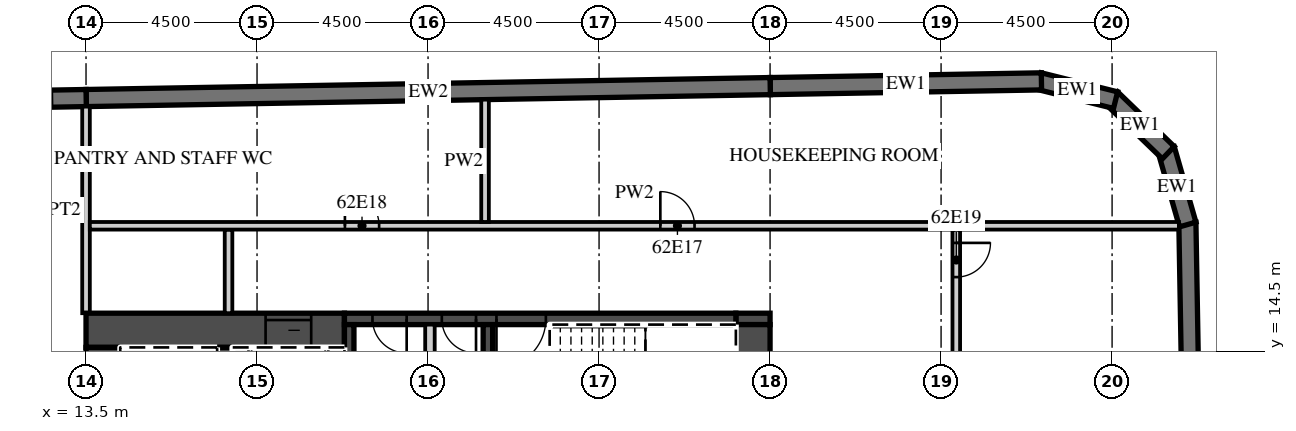
"""IFC4 building model, lengths in metres.
Left out: names, types, materials, properties, quantities, classifications, styles, units other than length and angle.
Written with IfcOpenShell. Run it as: python <this file> out.ifc"""

import sys

from ifc_helpers import new_model, si_unit, direction, frame, frame_2d, origin, place, context, subcontext, project, spatial, polyline, rectangle, outline, extrude, element, fill, save


model = new_model("IFC4")
c1 = context("Model", 3, precision=1e-05, world=origin(), true_north=direction((0.0, 1.0)))
c2 = subcontext(c1, "Body", "Model", "MODEL_VIEW")
j1 = project(units=[si_unit("LENGTHUNIT", "METRE"), si_unit("PLANEANGLEUNIT", "RADIAN")], contexts=[c1])
p1 = place(None, origin())
s1 = spatial("IfcSite", under=j1, at=p1, CompositionType="ELEMENT")
p2 = place(p1, origin())
s2 = spatial("IfcBuilding", under=s1, at=p2, CompositionType="ELEMENT")
p3 = place(p2, frame((0.0, 0.0, 250.7)))
s3 = spatial("IfcBuildingStorey", under=s2, at=p3, CompositionType="ELEMENT", Elevation=250.7)
p4 = place(p3, frame((43.057, -15.103, 0.0), z_axis=(0.0, 0.0, 1.0), x_axis=(-0.017452408953, 0.999847695112, 0.0)))
e1 = element("IfcWall", 1, at=p4, inside=s3, PredefinedType="SOLIDWALL", context=c2, shape_type="SweptSolid", body=[
    extrude(rectangle(XDim=33.0, YDim=0.45, at=frame_2d((16.5, 0.0))), origin(), (0.0, 0.0, 1.0), 3.02),
])
p5 = place(p3, frame((42.49, 17.833, 0.0), z_axis=(0.0, 0.0, 1.0), x_axis=(-0.275546368831, 0.961287781377, 0.0)))
e2 = element("IfcWall", 2, at=p5, inside=s3, PredefinedType="SOLIDWALL", context=c2, shape_type="SweptSolid", body=[
    extrude(outline(polyline([(0.0, -0.225), (2.071, -0.225), (1.95, 0.225), (0.121, 0.225), (0.0, -0.225)])), origin(), (0.0, 0.0, 1.0), 3.02),
])
p6 = place(p3, frame((41.979, 19.724, 0.0), z_axis=(0.0, 0.0, 1.0), x_axis=(-0.719379111448, 0.694617660308, 0.0)))
e3 = element("IfcWall", 3, at=p6, inside=s3, PredefinedType="SOLIDWALL", context=c2, shape_type="SweptSolid", body=[
    extrude(outline(polyline([(0.0, -0.225), (2.071, -0.225), (1.95, 0.225), (0.121, 0.225), (0.0, -0.225)])), origin(), (0.0, 0.0, 1.0), 3.02),
])
p7 = place(p3, frame((40.591, 21.106, 0.0), z_axis=(0.0, 0.0, 1.0), x_axis=(-0.970287979719, 0.241952963225, 0.0)))
e4 = element("IfcWall", 4, at=p7, inside=s3, PredefinedType="SOLIDWALL", context=c2, shape_type="SweptSolid", body=[
    extrude(outline(polyline([(0.0, -0.225), (2.071, -0.225), (1.95, 0.225), (0.121, 0.225), (0.0, -0.225)])), origin(), (0.0, 0.0, 1.0), 3.02),
])
p8 = place(p3, frame((38.641, 21.6, 0.0), z_axis=(0.0, 0.0, 1.0), x_axis=(-0.999847245074, -0.017478172627, 0.0)))
e5 = element("IfcWall", 5, at=p8, inside=s3, PredefinedType="SOLIDWALL", context=c2, shape_type="SweptSolid", body=[
    extrude(rectangle(XDim=7.138, YDim=0.45, at=frame_2d((3.569, 0.0))), origin(), (0.0, 0.0, 1.0), 3.02),
])
p9 = place(p3, frame((31.504, 21.476, 0.0), z_axis=(0.0, 0.0, 1.0), x_axis=(-0.999847677887, -0.017453395744, 0.0)))
e6 = element("IfcWall", 6, at=p9, inside=s3, PredefinedType="SOLIDWALL", context=c2, shape_type="SweptSolid", body=[
    extrude(rectangle(XDim=18.003, YDim=0.45, at=frame_2d((9.001, 0.0))), origin(), (0.0, 0.0, 1.0), 3.02),
])
p10 = place(p3, frame((13.504, 21.161, 0.0), z_axis=(0.0, 0.0, 1.0), x_axis=(-0.999847763257, -0.017448504532, 0.0)))
e7 = element("IfcWall", 7, at=p10, inside=s3, PredefinedType="SOLIDWALL", context=c2, shape_type="SweptSolid", body=[
    extrude(rectangle(XDim=46.859, YDim=0.45, at=frame_2d((23.43, 0.0))), origin(), (0.0, 0.0, 1.0), 3.02),
])
p11 = place(p10, frame((0.9, 0.0, 0.45)))
e8 = element("IfcOpeningElement", 8, at=p11, cuts=e7, PredefinedType="OPENING", context=c2, shape_type="SweptSolid", body=[
    extrude(rectangle(XDim=2.7, YDim=2.25, at=frame_2d((1.35, 1.125))), frame((0.0, 0.235, 0.0), z_axis=(0.0, -1.0, 0.0), x_axis=(1.0, 0.0, 0.0)), (0.0, 0.0, 1.0), 0.47),
])
p12 = place(p10, frame((5.401, 0.0, 0.45)))
e9 = element("IfcOpeningElement", 9, at=p12, cuts=e7, PredefinedType="OPENING", context=c2, shape_type="SweptSolid", body=[
    extrude(rectangle(XDim=2.7, YDim=2.25, at=frame_2d((1.35, 1.125))), frame((0.0, 0.235, 0.0), z_axis=(0.0, -1.0, 0.0), x_axis=(1.0, 0.0, 0.0)), (0.0, 0.0, 1.0), 0.47),
])
p13 = place(p10, frame((9.902, 0.0, 0.45)))
e10 = element("IfcOpeningElement", 10, at=p13, cuts=e7, PredefinedType="OPENING", context=c2, shape_type="SweptSolid", body=[
    extrude(rectangle(XDim=2.7, YDim=2.25, at=frame_2d((1.35, 1.125))), frame((0.0, 0.235, 0.0), z_axis=(0.0, -1.0, 0.0), x_axis=(1.0, 0.0, 0.0)), (0.0, 0.0, 1.0), 0.47),
])
p14 = place(p10, frame((14.402, 0.0, 0.45)))
e11 = element("IfcOpeningElement", 11, at=p14, cuts=e7, PredefinedType="OPENING", context=c2, shape_type="SweptSolid", body=[
    extrude(rectangle(XDim=2.7, YDim=2.25, at=frame_2d((1.35, 1.125))), frame((0.0, 0.235, 0.0), z_axis=(0.0, -1.0, 0.0), x_axis=(1.0, 0.0, 0.0)), (0.0, 0.0, 1.0), 0.47),
])
p15 = place(p10, frame((18.903, 0.0, 0.45)))
e12 = element("IfcOpeningElement", 12, at=p15, cuts=e7, PredefinedType="OPENING", context=c2, shape_type="SweptSolid", body=[
    extrude(rectangle(XDim=2.7, YDim=2.25, at=frame_2d((1.35, 1.125))), frame((0.0, 0.235, 0.0), z_axis=(0.0, -1.0, 0.0), x_axis=(1.0, 0.0, 0.0)), (0.0, 0.0, 1.0), 0.47),
])
p16 = place(p10, frame((23.404, 0.0, 0.45)))
e13 = element("IfcOpeningElement", 13, at=p16, cuts=e7, PredefinedType="OPENING", context=c2, shape_type="SweptSolid", body=[
    extrude(rectangle(XDim=2.7, YDim=2.25, at=frame_2d((1.35, 1.125))), frame((0.0, 0.235, 0.0), z_axis=(0.0, -1.0, 0.0), x_axis=(1.0, 0.0, 0.0)), (0.0, 0.0, 1.0), 0.47),
])
p17 = place(p10, frame((27.904, 0.0, 0.45)))
e14 = element("IfcOpeningElement", 14, at=p17, cuts=e7, PredefinedType="OPENING", context=c2, shape_type="SweptSolid", body=[
    extrude(rectangle(XDim=2.7, YDim=2.25, at=frame_2d((1.35, 1.125))), frame((0.0, 0.235, 0.0), z_axis=(0.0, -1.0, 0.0), x_axis=(1.0, 0.0, 0.0)), (0.0, 0.0, 1.0), 0.47),
])
p18 = place(p10, frame((32.405, 0.0, 0.45)))
e15 = element("IfcOpeningElement", 15, at=p18, cuts=e7, PredefinedType="OPENING", context=c2, shape_type="SweptSolid", body=[
    extrude(rectangle(XDim=2.7, YDim=2.25, at=frame_2d((1.35, 1.125))), frame((0.0, 0.235, 0.0), z_axis=(0.0, -1.0, 0.0), x_axis=(1.0, 0.0, 0.0)), (0.0, 0.0, 1.0), 0.47),
])
p19 = place(p10, frame((36.906, 0.0, 0.45)))
e16 = element("IfcOpeningElement", 16, at=p19, cuts=e7, PredefinedType="OPENING", context=c2, shape_type="SweptSolid", body=[
    extrude(rectangle(XDim=2.7, YDim=2.25, at=frame_2d((1.35, 1.125))), frame((0.0, 0.235, 0.0), z_axis=(0.0, -1.0, 0.0), x_axis=(1.0, 0.0, 0.0)), (0.0, 0.0, 1.0), 0.47),
])
p20 = place(p10, frame((41.406, 0.0, 0.45)))
e17 = element("IfcOpeningElement", 17, at=p20, cuts=e7, PredefinedType="OPENING", context=c2, shape_type="SweptSolid", body=[
    extrude(rectangle(XDim=2.7, YDim=2.25, at=frame_2d((1.35, 1.125))), frame((0.0, 0.235, 0.0), z_axis=(0.0, -1.0, 0.0), x_axis=(1.0, 0.0, 0.0)), (0.0, 0.0, 1.0), 0.47),
])
p21 = place(p3, frame((13.5, 15.5, 0.0), z_axis=(0.0, 0.0, 1.0), x_axis=(0.0, 1.0, 0.0)))
e18 = element("IfcWall", 18, at=p21, inside=s3, PredefinedType="PARTITIONING", context=c2, shape_type="SweptSolid", body=[
    extrude(rectangle(XDim=5.436, YDim=0.2, at=frame_2d((2.718, 0.0))), origin(), (0.0, 0.0, 1.0), 3.02),
])
p22 = place(p3, frame((13.5, 15.05, 0.0), z_axis=(0.0, 0.0, 1.0), x_axis=(1.0, 0.0, 0.0)))
e19 = element("IfcWall", 19, at=p22, inside=s3, PredefinedType="SHEAR", context=c2, shape_type="SweptSolid", body=[
    extrude(rectangle(XDim=6.8, YDim=0.9, at=frame_2d((3.4, 0.0))), origin(), (0.0, 0.0, 1.0), 3.02),
])
p23 = place(p22, frame((4.725, 0.0, 0.0)))
e20 = element("IfcOpeningElement", 20, at=p23, cuts=e19, PredefinedType="OPENING", context=c2, shape_type="SweptSolid", body=[
    extrude(rectangle(XDim=1.2, YDim=2.1, at=frame_2d((0.6, 1.05))), frame((0.0, 0.46, 0.0), z_axis=(0.0, -1.0, 0.0), x_axis=(1.0, 0.0, 0.0)), (0.0, 0.0, 1.0), 0.92),
])
p24 = place(p3, frame((30.6, 15.35, 0.0), z_axis=(0.0, 0.0, 1.0), x_axis=(1.0, 0.0, 0.0)))
e21 = element("IfcWall", 21, at=p24, inside=s3, PredefinedType="SHEAR", context=c2, shape_type="SweptSolid", body=[
    extrude(rectangle(XDim=0.9, YDim=0.3, at=frame_2d((0.45, 0.0))), origin(), (0.0, 0.0, 1.0), 3.02),
])
p25 = place(p3, frame((20.3, 15.35, 0.0), z_axis=(0.0, 0.0, 1.0), x_axis=(1.0, 0.0, 0.0)))
e22 = element("IfcWall", 22, at=p25, inside=s3, PredefinedType="SHEAR", context=c2, shape_type="SweptSolid", body=[
    extrude(rectangle(XDim=10.3, YDim=0.3, at=frame_2d((5.15, 0.0))), origin(), (0.0, 0.0, 1.0), 3.02),
])
p26 = place(p25, frame((4.0, 0.0, 0.0)))
e23 = element("IfcOpeningElement", 23, at=p26, cuts=e22, PredefinedType="OPENING", context=c2, shape_type="SweptSolid", body=[
    extrude(rectangle(XDim=1.3, YDim=2.1, at=frame_2d((0.65, 1.05))), frame((0.0, 0.16, 0.0), z_axis=(0.0, -1.0, 0.0), x_axis=(1.0, 0.0, 0.0)), (0.0, 0.0, 1.0), 0.32),
])
p27 = place(p25, frame((2.562, 0.0, 0.0)))
e24 = element("IfcOpeningElement", 24, at=p27, cuts=e22, PredefinedType="OPENING", context=c2, shape_type="SweptSolid", body=[
    extrude(rectangle(XDim=0.9, YDim=2.1, at=frame_2d((0.45, 1.05))), frame((0.0, 0.16, 0.0), z_axis=(0.0, -1.0, 0.0), x_axis=(1.0, 0.0, 0.0)), (0.0, 0.0, 1.0), 0.32),
])
p28 = place(p25, frame((0.738, 0.0, 0.0)))
e25 = element("IfcOpeningElement", 25, at=p28, cuts=e22, PredefinedType="OPENING", context=c2, shape_type="SweptSolid", body=[
    extrude(rectangle(XDim=0.9, YDim=2.1, at=frame_2d((0.45, 1.05))), frame((0.0, 0.16, 0.0), z_axis=(0.0, -1.0, 0.0), x_axis=(1.0, 0.0, 0.0)), (0.0, 0.0, 1.0), 0.32),
])
p29 = place(p3, frame((31.05, 2.4, 0.0), z_axis=(0.0, 0.0, 1.0), x_axis=(0.0, 1.0, 0.0)))
e26 = element("IfcWall", 26, at=p29, inside=s3, PredefinedType="SHEAR", context=c2, shape_type="SweptSolid", body=[
    extrude(rectangle(XDim=12.8, YDim=0.9, at=frame_2d((6.4, 0.0))), origin(), (0.0, 0.0, 1.0), 3.02),
])
p30 = place(p29, frame((0.2, 0.0, 0.0)))
e27 = element("IfcOpeningElement", 27, at=p30, cuts=e26, PredefinedType="OPENING", context=c2, shape_type="SweptSolid", body=[
    extrude(rectangle(XDim=1.1, YDim=2.1, at=frame_2d((0.55, 1.05))), frame((0.0, 0.46, 0.0), z_axis=(0.0, -1.0, 0.0), x_axis=(1.0, 0.0, 0.0)), (0.0, 0.0, 1.0), 0.92),
])
p31 = place(p3, frame((13.95, 2.4, 0.0), z_axis=(0.0, 0.0, 1.0), x_axis=(0.0, 1.0, 0.0)))
e28 = element("IfcWall", 28, at=p31, inside=s3, PredefinedType="SHEAR", context=c2, shape_type="SweptSolid", body=[
    extrude(rectangle(XDim=12.2, YDim=0.9, at=frame_2d((6.1, 0.0))), origin(), (0.0, 0.0, 1.0), 3.02),
])
p32 = place(p3, frame((17.15, 8.8, 0.0), z_axis=(0.0, 0.0, 1.0), x_axis=(0.0, 1.0, 0.0)))
e29 = element("IfcWall", 29, at=p32, inside=s3, PredefinedType="SHEAR", context=c2, shape_type="SweptSolid", body=[
    extrude(rectangle(XDim=5.8, YDim=0.4, at=frame_2d((2.9, 0.0))), origin(), (0.0, 0.0, 1.0), 3.02),
])
for number, where, z_axis, x_axis in (
    (30, (20.425, 11.95, 0.0), (0.0, 0.0, 1.0), (0.0, 1.0, 0.0)),
    (31, (24.075, 11.95, 0.0), (0.0, 0.0, 1.0), (0.0, 1.0, 0.0)),
):
    element("IfcWall", number, at=place(p3, frame(where, z_axis=z_axis, x_axis=x_axis)), inside=s3, PredefinedType="SHEAR", context=c2, shape_type="SweptSolid", body=[
        extrude(rectangle(XDim=3.25, YDim=0.25, at=frame_2d((1.625, 0.0))), origin(), (0.0, 0.0, 1.0), 3.02),
    ])
p33 = place(p3, frame((22.55, 11.95, 0.0), z_axis=(0.0, 0.0, 1.0), x_axis=(0.0, 1.0, 0.0)))
e32 = element("IfcWall", 32, at=p33, inside=s3, PredefinedType="PARTITIONING", context=c2, shape_type="SweptSolid", body=[
    extrude(rectangle(XDim=3.25, YDim=0.25, at=frame_2d((1.625, 0.0))), origin(), (0.0, 0.0, 1.0), 3.02),
])
p34 = place(p3, frame((17.25, 15.5, 0.0), z_axis=(0.0, 0.0, 1.0), x_axis=(0.0, 1.0, 0.0)))
e33 = element("IfcWall", 33, at=p34, inside=s3, PredefinedType="PARTITIONING", context=c2, shape_type="SweptSolid", body=[
    extrude(rectangle(XDim=2.2, YDim=0.2, at=frame_2d((1.1, 0.0))), origin(), (0.0, 0.0, 1.0), 3.02),
])
p35 = place(p3, frame((36.4, 1.75, 0.0), z_axis=(0.0, 0.0, 1.0), x_axis=(0.0, 1.0, 0.0)))
e34 = element("IfcWall", 34, at=p35, inside=s3, PredefinedType="PARTITIONING", context=c2, shape_type="SweptSolid", body=[
    extrude(rectangle(XDim=15.95, YDim=0.2, at=frame_2d((7.975, 0.0))), origin(), (0.0, 0.0, 1.0), 3.02),
])
p36 = place(p35, frame((14.7, 0.0, 0.0)))
e35 = element("IfcOpeningElement", 35, at=p36, cuts=e34, PredefinedType="OPENING", context=c2, shape_type="SweptSolid", body=[
    extrude(rectangle(XDim=0.9, YDim=2.1, at=frame_2d((0.45, 1.05))), frame((0.0, 0.11, 0.0), z_axis=(0.0, -1.0, 0.0), x_axis=(1.0, 0.0, 0.0)), (0.0, 0.0, 1.0), 0.22),
])
p37 = place(p3, frame((13.6, 17.8, 0.0), z_axis=(0.0, 0.0, 1.0), x_axis=(1.0, 0.0, 0.0)))
e36 = element("IfcWall", 36, at=p37, inside=s3, PredefinedType="PARTITIONING", context=c2, shape_type="SweptSolid", body=[
    extrude(rectangle(XDim=28.657, YDim=0.2, at=frame_2d((14.329, 0.0))), origin(), (0.0, 0.0, 1.0), 3.02),
])
p38 = place(p37, frame((15.012, 0.0, 0.0)))
e37 = element("IfcOpeningElement", 37, at=p38, cuts=e36, PredefinedType="OPENING", context=c2, shape_type="SweptSolid", body=[
    extrude(rectangle(XDim=0.9, YDim=2.1, at=frame_2d((0.45, 1.05))), frame((0.0, 0.11, 0.0), z_axis=(0.0, -1.0, 0.0), x_axis=(1.0, 0.0, 0.0)), (0.0, 0.0, 1.0), 0.22),
])
p39 = place(p37, frame((6.712, 0.0, 0.0)))
e38 = element("IfcOpeningElement", 38, at=p39, cuts=e36, PredefinedType="OPENING", context=c2, shape_type="SweptSolid", body=[
    extrude(rectangle(XDim=0.9, YDim=2.1, at=frame_2d((0.45, 1.05))), frame((0.0, 0.11, 0.0), z_axis=(0.0, -1.0, 0.0), x_axis=(1.0, 0.0, 0.0)), (0.0, 0.0, 1.0), 0.22),
])
p40 = place(p3, frame((24.0, 17.9, 0.0), z_axis=(0.0, 0.0, 1.0), x_axis=(0.0, 1.0, 0.0)))
e39 = element("IfcWall", 39, at=p40, inside=s3, PredefinedType="PARTITIONING", context=c2, shape_type="SweptSolid", body=[
    extrude(rectangle(XDim=3.22, YDim=0.2, at=frame_2d((1.61, 0.0))), origin(), (0.0, 0.0, 1.0), 3.02),
])
p41 = place(p11, origin())
e40 = element("IfcWindow", 40, at=p41, inside=s3, PartitioningType="SINGLE_PANEL", PredefinedType="WINDOW", context=c2, shape_type="SweptSolid", body=[
    extrude(rectangle(XDim=2.7, YDim=2.25, at=frame_2d((1.35, 1.125))), frame((0.0, 0.09, 0.0), z_axis=(0.0, -1.0, 0.0), x_axis=(1.0, 0.0, 0.0)), (0.0, 0.0, 1.0), 0.06),
])
fill(e8, e40)
p42 = place(p23, origin())
e41 = element("IfcDoor", 41, at=p42, inside=s3, OperationType="SLIDING_TO_LEFT", PredefinedType="DOOR", context=c2, shape_type="SweptSolid", body=[
    extrude(rectangle(XDim=1.2, YDim=2.1, at=frame_2d((0.6, 1.05))), frame((0.0, 0.025, 0.0), z_axis=(0.0, -1.0, 0.0), x_axis=(1.0, 0.0, 0.0)), (0.0, 0.0, 1.0), 0.05),
])
fill(e20, e41)
p43 = place(p26, origin())
e42 = element("IfcDoor", 42, at=p43, inside=s3, OperationType="SINGLE_SWING_LEFT", PredefinedType="DOOR", context=c2, shape_type="SweptSolid", body=[
    extrude(rectangle(XDim=1.3, YDim=2.1, at=frame_2d((0.65, 1.05))), frame((0.0, 0.025, 0.0), z_axis=(0.0, -1.0, 0.0), x_axis=(1.0, 0.0, 0.0)), (0.0, 0.0, 1.0), 0.05),
])
fill(e23, e42)
p44 = place(p27, origin())
e43 = element("IfcDoor", 43, at=p44, inside=s3, OperationType="SINGLE_SWING_RIGHT", PredefinedType="DOOR", context=c2, shape_type="SweptSolid", body=[
    extrude(rectangle(XDim=0.9, YDim=2.1, at=frame_2d((0.45, 1.05))), frame((0.0, 0.025, 0.0), z_axis=(0.0, -1.0, 0.0), x_axis=(1.0, 0.0, 0.0)), (0.0, 0.0, 1.0), 0.05),
])
fill(e24, e43)
p45 = place(p28, origin())
e44 = element("IfcDoor", 44, at=p45, inside=s3, OperationType="SINGLE_SWING_RIGHT", PredefinedType="DOOR", context=c2, shape_type="SweptSolid", body=[
    extrude(rectangle(XDim=0.9, YDim=2.1, at=frame_2d((0.45, 1.05))), frame((0.0, 0.025, 0.0), z_axis=(0.0, -1.0, 0.0), x_axis=(1.0, 0.0, 0.0)), (0.0, 0.0, 1.0), 0.05),
])
fill(e25, e44)
p46 = place(p38, origin())
e45 = element("IfcDoor", 45, at=p46, inside=s3, OperationType="SINGLE_SWING_LEFT", PredefinedType="DOOR", context=c2, shape_type="SweptSolid", body=[
    extrude(rectangle(XDim=0.9, YDim=2.1, at=frame_2d((0.45, 1.05))), frame((0.0, 0.025, 0.0), z_axis=(0.0, -1.0, 0.0), x_axis=(1.0, 0.0, 0.0)), (0.0, 0.0, 1.0), 0.05),
])
fill(e37, e45)
p47 = place(p39, origin())
e46 = element("IfcDoor", 46, at=p47, inside=s3, OperationType="SINGLE_SWING_LEFT", PredefinedType="DOOR", context=c2, shape_type="SweptSolid", body=[
    extrude(rectangle(XDim=0.9, YDim=2.1, at=frame_2d((0.45, 1.05))), frame((0.0, 0.025, 0.0), z_axis=(0.0, -1.0, 0.0), x_axis=(1.0, 0.0, 0.0)), (0.0, 0.0, 1.0), 0.05),
])
fill(e38, e46)
p48 = place(p36, origin())
e47 = element("IfcDoor", 47, at=p48, inside=s3, OperationType="SINGLE_SWING_RIGHT", PredefinedType="DOOR", context=c2, shape_type="SweptSolid", body=[
    extrude(rectangle(XDim=0.9, YDim=2.1, at=frame_2d((0.45, 1.05))), frame((0.0, 0.025, 0.0), z_axis=(0.0, -1.0, 0.0), x_axis=(1.0, 0.0, 0.0)), (0.0, 0.0, 1.0), 0.05),
])
fill(e35, e47)
save(model, sys.argv[1])
